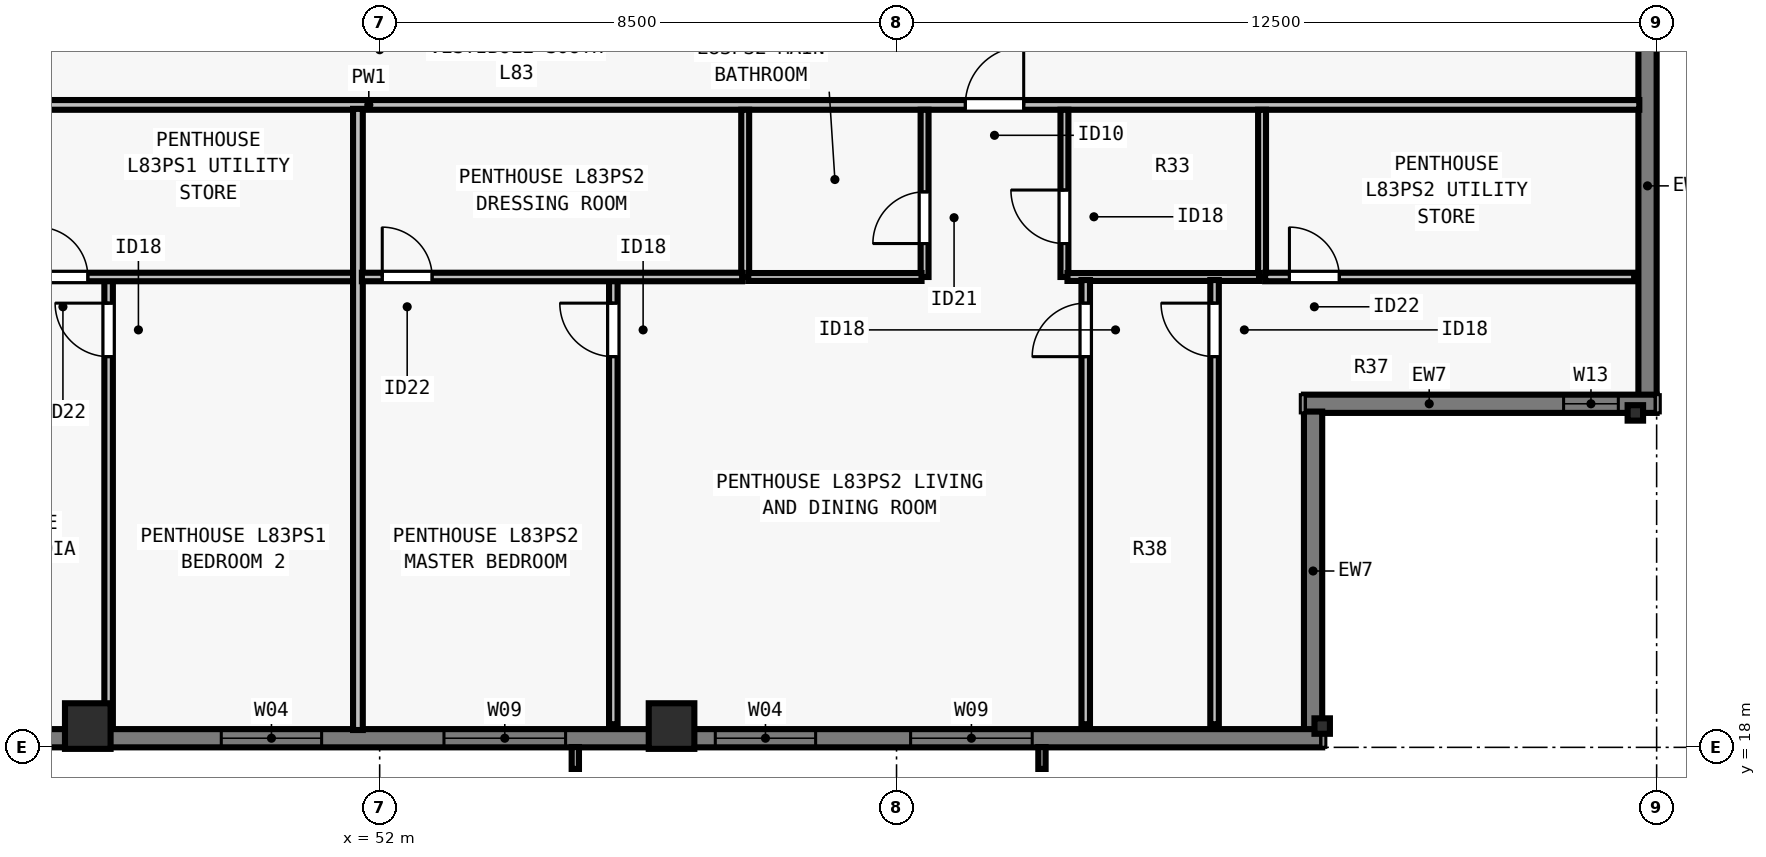
"""IFC4 building model, lengths in metres.
Left out: names, types, materials, properties, quantities, classifications, styles, units other than length and angle.
Written with IfcOpenShell. Run it as: python <this file> out.ifc"""

import sys

from ifc_helpers import new_model, si_unit, direction, frame, frame_2d, origin, origin_2d, place, context, subcontext, project, spatial, rectangle, i_section, extrude, element, fill, save


model = new_model("IFC4")
c1 = context("Model", 3, precision=1e-05, world=origin(), true_north=direction((0.0, 1.0)))
c2 = subcontext(c1, "Body", "Model", "MODEL_VIEW")
j1 = project(units=[si_unit("LENGTHUNIT", "METRE"), si_unit("PLANEANGLEUNIT", "RADIAN")], contexts=[c1])
p1 = place(None, origin())
s1 = spatial("IfcSite", under=j1, at=p1, CompositionType="ELEMENT")
p2 = place(p1, origin())
s2 = spatial("IfcBuilding", under=s1, at=p2, CompositionType="ELEMENT")
p3 = place(p2, frame((0.0, 0.0, 301.5)))
s3 = spatial("IfcBuildingStorey", under=s2, at=p3, CompositionType="ELEMENT", Elevation=301.5)
for number, where, z_axis, x_axis in (
    (1, (47.2, 18.35, 0.0), (0.0, 0.0, 1.0), (1.0, 0.0, 0.0)),
    (2, (56.8, 18.35, 0.0), (0.0, 0.0, 1.0), (1.0, 0.0, 0.0)),
):
    element("IfcColumn", number, at=place(p3, frame(where, z_axis=z_axis, x_axis=x_axis)), inside=s3, PredefinedType="COLUMN", context=c2, shape_type="SweptSolid", body=[
        extrude(rectangle(XDim=0.75, YDim=0.75, at=origin_2d()), origin(), (0.0, 0.0, 1.0), 3.5),
    ])
for number, where, z_axis, x_axis in (
    (3, (67.5, 18.35, 0.0), (0.0, 0.0, 1.0), (1.0, 0.0, 0.0)),
    (4, (72.65, 23.5, 0.0), (0.0, 0.0, 1.0), (0.0, 1.0, 0.0)),
):
    element("IfcColumn", number, at=place(p3, frame(where, z_axis=z_axis, x_axis=x_axis)), inside=s3, PredefinedType="COLUMN", context=c2, shape_type="SweptSolid", body=[
        extrude(i_section(OverallWidth=0.254, OverallDepth=0.254, WebThickness=0.009, FlangeThickness=0.014, FilletRadius=0.013, at=origin_2d()), origin(), (0.0, 0.0, 1.0), 3.5),
    ])
p4 = place(p3, frame((72.85, 34.8, 0.0), z_axis=(0.0, 0.0, 1.0), x_axis=(0.0, -1.0, 0.0)))
e5 = element("IfcWall", 5, at=p4, inside=s3, PredefinedType="SOLIDWALL", context=c2, shape_type="SweptSolid", body=[
    extrude(rectangle(XDim=11.022, YDim=0.3, at=frame_2d((5.511, 0.0))), origin(), (0.0, 0.0, 1.0), 3.29),
])
p5 = place(p4, frame((1.961, 0.0, 0.8)))
e6 = element("IfcOpeningElement", 6, at=p5, cuts=e5, PredefinedType="OPENING", context=c2, shape_type="SweptSolid", body=[
    extrude(rectangle(XDim=2.0, YDim=1.758, at=frame_2d((1.0, 0.879))), frame((0.0, 0.16, 0.0), z_axis=(0.0, -1.0, 0.0), x_axis=(1.0, 0.0, 0.0)), (0.0, 0.0, 1.0), 0.32),
])
p6 = place(p3, frame((73.0, 23.65, 0.0), z_axis=(0.0, 0.0, 1.0), x_axis=(-1.0, 0.0, 0.0)))
e7 = element("IfcWall", 7, at=p6, inside=s3, PredefinedType="SOLIDWALL", context=c2, shape_type="SweptSolid", body=[
    extrude(rectangle(XDim=5.8, YDim=0.3, at=frame_2d((2.9, 0.0))), origin(), (0.0, 0.0, 1.0), 3.29),
])
p7 = place(p6, frame((0.63, 0.0, 0.8)))
e8 = element("IfcOpeningElement", 8, at=p7, cuts=e7, PredefinedType="OPENING", context=c2, shape_type="SweptSolid", body=[
    extrude(rectangle(XDim=0.9, YDim=1.75, at=frame_2d((0.45, 0.875))), frame((0.0, 0.16, 0.0), z_axis=(0.0, -1.0, 0.0), x_axis=(1.0, 0.0, 0.0)), (0.0, 0.0, 1.0), 0.32),
])
p8 = place(p3, frame((67.35, 23.522, 0.0), z_axis=(0.0, 0.0, 1.0), x_axis=(0.0, -1.0, 0.0)))
e9 = element("IfcWall", 9, at=p8, inside=s3, PredefinedType="SOLIDWALL", context=c2, shape_type="SweptSolid", body=[
    extrude(rectangle(XDim=5.244, YDim=0.3, at=frame_2d((2.622, 0.0))), origin(), (0.0, 0.0, 1.0), 3.29),
])
p9 = place(p3, frame((67.5, 18.15, 0.0), z_axis=(0.0, 0.0, 1.0), x_axis=(-1.0, 0.0, 0.0)))
e10 = element("IfcWall", 10, at=p9, inside=s3, PredefinedType="SOLIDWALL", context=c2, shape_type="SweptSolid", body=[
    extrude(rectangle(XDim=30.722, YDim=0.3, at=frame_2d((15.361, 0.0))), origin(), (0.0, 0.0, 1.0), 3.29),
])
p10 = place(p9, frame((4.769, 0.0, 0.8)))
e11 = element("IfcOpeningElement", 11, at=p10, cuts=e10, PredefinedType="OPENING", context=c2, shape_type="SweptSolid", body=[
    extrude(rectangle(XDim=2.0, YDim=1.758, at=frame_2d((1.0, 0.879))), frame((0.0, 0.16, 0.0), z_axis=(0.0, -1.0, 0.0), x_axis=(1.0, 0.0, 0.0)), (0.0, 0.0, 1.0), 0.32),
])
p11 = place(p9, frame((8.331, 0.0, 0.8)))
e12 = element("IfcOpeningElement", 12, at=p11, cuts=e10, PredefinedType="OPENING", context=c2, shape_type="SweptSolid", body=[
    extrude(rectangle(XDim=1.65, YDim=1.758, at=frame_2d((0.825, 0.879))), frame((0.0, 0.16, 0.0), z_axis=(0.0, -1.0, 0.0), x_axis=(1.0, 0.0, 0.0)), (0.0, 0.0, 1.0), 0.32),
])
p12 = place(p9, frame((12.442, 0.0, 0.8)))
e13 = element("IfcOpeningElement", 13, at=p12, cuts=e10, PredefinedType="OPENING", context=c2, shape_type="SweptSolid", body=[
    extrude(rectangle(XDim=2.0, YDim=1.758, at=frame_2d((1.0, 0.879))), frame((0.0, 0.16, 0.0), z_axis=(0.0, -1.0, 0.0), x_axis=(1.0, 0.0, 0.0)), (0.0, 0.0, 1.0), 0.32),
])
p13 = place(p9, frame((16.455, 0.0, 0.8)))
e14 = element("IfcOpeningElement", 14, at=p13, cuts=e10, PredefinedType="OPENING", context=c2, shape_type="SweptSolid", body=[
    extrude(rectangle(XDim=1.65, YDim=1.758, at=frame_2d((0.825, 0.879))), frame((0.0, 0.16, 0.0), z_axis=(0.0, -1.0, 0.0), x_axis=(1.0, 0.0, 0.0)), (0.0, 0.0, 1.0), 0.32),
])
p14 = place(p9, frame((20.967, 0.0, 0.8)))
e15 = element("IfcOpeningElement", 15, at=p14, cuts=e10, PredefinedType="OPENING", context=c2, shape_type="SweptSolid", body=[
    extrude(rectangle(XDim=2.0, YDim=1.758, at=frame_2d((1.0, 0.879))), frame((0.0, 0.16, 0.0), z_axis=(0.0, -1.0, 0.0), x_axis=(1.0, 0.0, 0.0)), (0.0, 0.0, 1.0), 0.32),
])
p15 = place(p9, frame((24.128, 0.0, 0.8)))
e16 = element("IfcOpeningElement", 16, at=p15, cuts=e10, PredefinedType="OPENING", context=c2, shape_type="SweptSolid", body=[
    extrude(rectangle(XDim=1.65, YDim=1.758, at=frame_2d((0.825, 0.879))), frame((0.0, 0.16, 0.0), z_axis=(0.0, -1.0, 0.0), x_axis=(1.0, 0.0, 0.0)), (0.0, 0.0, 1.0), 0.32),
])
p16 = place(p3, frame((31.285, 28.565, 0.0), z_axis=(0.0, 0.0, 1.0), x_axis=(1.0, 0.0, 0.0)))
e17 = element("IfcWall", 17, at=p16, inside=s3, PredefinedType="PARTITIONING", context=c2, shape_type="SweptSolid", body=[
    extrude(rectangle(XDim=41.43, YDim=0.16, at=frame_2d((20.715, 0.0))), origin(), (0.0, 0.0, 1.0), 3.009),
])
p17 = place(p16, frame((9.766, 0.0, 0.0)))
e18 = element("IfcOpeningElement", 18, at=p17, cuts=e17, PredefinedType="OPENING", context=c2, shape_type="SweptSolid", body=[
    extrude(rectangle(XDim=0.96, YDim=2.18, at=frame_2d((0.48, 1.09))), frame((0.0, 0.09, 0.0), z_axis=(0.0, -1.0, 0.0), x_axis=(1.0, 0.0, 0.0)), (0.0, 0.0, 1.0), 0.18),
])
p18 = place(p16, frame((30.346, 0.0, 0.0)))
e19 = element("IfcOpeningElement", 19, at=p18, cuts=e17, PredefinedType="OPENING", context=c2, shape_type="SweptSolid", body=[
    extrude(rectangle(XDim=0.96, YDim=2.18, at=frame_2d((0.48, 1.09))), frame((0.0, 0.09, 0.0), z_axis=(0.0, -1.0, 0.0), x_axis=(1.0, 0.0, 0.0)), (0.0, 0.0, 1.0), 0.18),
])
p19 = place(p3, frame((47.542, 18.38, 0.0), z_axis=(0.0, 0.0, 1.0), x_axis=(0.0, 1.0, 0.0)))
e20 = element("IfcWall", 20, at=p19, inside=s3, PredefinedType="PARTITIONING", context=c2, shape_type="SweptSolid", body=[
    extrude(rectangle(XDim=7.395, YDim=0.14, at=frame_2d((3.698, 0.0))), origin(), (0.0, 0.0, 1.0), 3.009),
])
p20 = place(p19, frame((6.045, 0.0, 0.0)))
e21 = element("IfcOpeningElement", 21, at=p20, cuts=e20, PredefinedType="OPENING", context=c2, shape_type="SweptSolid", body=[
    extrude(rectangle(XDim=0.88, YDim=2.1, at=frame_2d((0.44, 1.05))), frame((0.0, 0.08, 0.0), z_axis=(0.0, -1.0, 0.0), x_axis=(1.0, 0.0, 0.0)), (0.0, 0.0, 1.0), 0.16),
])
p21 = place(p3, frame((45.981, 25.735, 0.0), z_axis=(0.0, 0.0, 1.0), x_axis=(1.0, 0.0, 0.0)))
e22 = element("IfcWall", 22, at=p21, inside=s3, PredefinedType="PARTITIONING", context=c2, shape_type="SweptSolid", body=[
    extrude(rectangle(XDim=5.711, YDim=0.14, at=frame_2d((2.855, 0.0))), origin(), (0.0, 0.0, 1.0), 3.29),
])
p22 = place(p21, frame((0.4, 0.0, 0.0)))
e23 = element("IfcOpeningElement", 23, at=p22, cuts=e22, PredefinedType="OPENING", context=c2, shape_type="SweptSolid", body=[
    extrude(rectangle(XDim=0.82, YDim=2.1, at=frame_2d((0.41, 1.05))), frame((0.0, 0.08, 0.0), z_axis=(0.0, -1.0, 0.0), x_axis=(1.0, 0.0, 0.0)), (0.0, 0.0, 1.0), 0.16),
])
p23 = place(p3, frame((51.643, 18.285, 0.0), z_axis=(0.0, 0.0, 1.0), x_axis=(0.0, 1.0, 0.0)))
e24 = element("IfcWall", 24, at=p23, inside=s3, PredefinedType="PARTITIONING", context=c2, shape_type="SweptSolid", body=[
    extrude(rectangle(XDim=10.215, YDim=0.16, at=frame_2d((5.107, 0.0))), origin(), (0.0, 0.0, 1.0), 3.009),
])
p24 = place(p3, frame((58.011, 25.735, 0.0), z_axis=(0.0, 0.0, 1.0), x_axis=(0.0, 1.0, 0.0)))
e25 = element("IfcWall", 25, at=p24, inside=s3, PredefinedType="PLUMBINGWALL", context=c2, shape_type="SweptSolid", body=[
    extrude(rectangle(XDim=2.75, YDim=0.13, at=frame_2d((1.375, 0.0))), origin(), (0.0, 0.0, 1.0), 3.29),
])
p25 = place(p3, frame((60.961, 25.735, 0.0), z_axis=(0.0, 0.0, 1.0), x_axis=(0.0, 1.0, 0.0)))
e26 = element("IfcWall", 26, at=p25, inside=s3, PredefinedType="PLUMBINGWALL", context=c2, shape_type="SweptSolid", body=[
    extrude(rectangle(XDim=2.75, YDim=0.13, at=frame_2d((1.375, 0.0))), origin(), (0.0, 0.0, 1.0), 3.29),
])
p26 = place(p25, frame((0.55, 0.0, 0.0)))
e27 = element("IfcOpeningElement", 27, at=p26, cuts=e26, PredefinedType="OPENING", context=c2, shape_type="SweptSolid", body=[
    extrude(rectangle(XDim=0.85, YDim=2.08, at=frame_2d((0.425, 1.04))), frame((0.0, 0.075, 0.0), z_axis=(0.0, -1.0, 0.0), x_axis=(1.0, 0.0, 0.0)), (0.0, 0.0, 1.0), 0.15),
])
p27 = place(p3, frame((58.061, 25.735, 0.0), z_axis=(0.0, 0.0, 1.0), x_axis=(1.0, 0.0, 0.0)))
e28 = element("IfcWall", 28, at=p27, inside=s3, PredefinedType="PLUMBINGWALL", context=c2, shape_type="SweptSolid", body=[
    extrude(rectangle(XDim=2.85, YDim=0.13, at=frame_2d((1.425, 0.0))), origin(), (0.0, 0.0, 1.0), 3.29),
])
p28 = place(p3, frame((66.511, 25.735, 0.0), z_axis=(0.0, 0.0, 1.0), x_axis=(0.0, 1.0, 0.0)))
e29 = element("IfcWall", 29, at=p28, inside=s3, PredefinedType="PLUMBINGWALL", context=c2, shape_type="SweptSolid", body=[
    extrude(rectangle(XDim=2.75, YDim=0.13, at=frame_2d((1.375, 0.0))), origin(), (0.0, 0.0, 1.0), 3.29),
])
p29 = place(p3, frame((63.261, 25.735, 0.0), z_axis=(0.0, 0.0, 1.0), x_axis=(0.0, 1.0, 0.0)))
e30 = element("IfcWall", 30, at=p29, inside=s3, PredefinedType="PLUMBINGWALL", context=c2, shape_type="SweptSolid", body=[
    extrude(rectangle(XDim=2.75, YDim=0.13, at=frame_2d((1.375, 0.0))), origin(), (0.0, 0.0, 1.0), 3.29),
])
p30 = place(p29, frame((0.55, 0.0, 0.0)))
e31 = element("IfcOpeningElement", 31, at=p30, cuts=e30, PredefinedType="OPENING", context=c2, shape_type="SweptSolid", body=[
    extrude(rectangle(XDim=0.88, YDim=2.1, at=frame_2d((0.44, 1.05))), frame((0.0, 0.075, 0.0), z_axis=(0.0, -1.0, 0.0), x_axis=(1.0, 0.0, 0.0)), (0.0, 0.0, 1.0), 0.15),
])
p31 = place(p3, frame((63.311, 25.735, 0.0), z_axis=(0.0, 0.0, 1.0), x_axis=(1.0, 0.0, 0.0)))
e32 = element("IfcWall", 32, at=p31, inside=s3, PredefinedType="PLUMBINGWALL", context=c2, shape_type="SweptSolid", body=[
    extrude(rectangle(XDim=3.15, YDim=0.13, at=frame_2d((1.575, 0.0))), origin(), (0.0, 0.0, 1.0), 3.29),
])
p32 = place(p3, frame((55.843, 18.38, 0.0), z_axis=(0.0, 0.0, 1.0), x_axis=(0.0, 1.0, 0.0)))
e33 = element("IfcWall", 33, at=p32, inside=s3, PredefinedType="PARTITIONING", context=c2, shape_type="SweptSolid", body=[
    extrude(rectangle(XDim=7.395, YDim=0.14, at=frame_2d((3.698, 0.0))), origin(), (0.0, 0.0, 1.0), 3.29),
])
p33 = place(p32, frame((6.045, 0.0, 0.0)))
e34 = element("IfcOpeningElement", 34, at=p33, cuts=e33, PredefinedType="OPENING", context=c2, shape_type="SweptSolid", body=[
    extrude(rectangle(XDim=0.88, YDim=2.1, at=frame_2d((0.44, 1.05))), frame((0.0, 0.08, 0.0), z_axis=(0.0, -1.0, 0.0), x_axis=(1.0, 0.0, 0.0)), (0.0, 0.0, 1.0), 0.16),
])
p34 = place(p3, frame((51.708, 25.735, 0.0), z_axis=(0.0, 0.0, 1.0), x_axis=(1.0, 0.0, 0.0)))
e35 = element("IfcWall", 35, at=p34, inside=s3, PredefinedType="PARTITIONING", context=c2, shape_type="SweptSolid", body=[
    extrude(rectangle(XDim=6.254, YDim=0.14, at=frame_2d((3.127, 0.0))), origin(), (0.0, 0.0, 1.0), 3.29),
])
p35 = place(p34, frame((0.335, 0.0, 0.0)))
e36 = element("IfcOpeningElement", 36, at=p35, cuts=e35, PredefinedType="OPENING", context=c2, shape_type="SweptSolid", body=[
    extrude(rectangle(XDim=0.82, YDim=2.1, at=frame_2d((0.41, 1.05))), frame((0.0, 0.08, 0.0), z_axis=(0.0, -1.0, 0.0), x_axis=(1.0, 0.0, 0.0)), (0.0, 0.0, 1.0), 0.16),
])
p36 = place(p3, frame((65.73, 18.38, 0.0), z_axis=(0.0, 0.0, 1.0), x_axis=(0.0, 1.0, 0.0)))
e37 = element("IfcWall", 37, at=p36, inside=s3, PredefinedType="PARTITIONING", context=c2, shape_type="SweptSolid", body=[
    extrude(rectangle(XDim=7.305, YDim=0.14, at=frame_2d((3.653, 0.0))), origin(), (0.0, 0.0, 1.0), 2.653),
])
p37 = place(p36, frame((6.045, 0.0, 0.0)))
e38 = element("IfcOpeningElement", 38, at=p37, cuts=e37, PredefinedType="OPENING", context=c2, shape_type="SweptSolid", body=[
    extrude(rectangle(XDim=0.88, YDim=2.1, at=frame_2d((0.44, 1.05))), frame((0.0, 0.08, 0.0), z_axis=(0.0, -1.0, 0.0), x_axis=(1.0, 0.0, 0.0)), (0.0, 0.0, 1.0), 0.16),
])
p38 = place(p3, frame((66.561, 25.735, 0.0), z_axis=(0.0, 0.0, 1.0), x_axis=(1.0, 0.0, 0.0)))
e39 = element("IfcWall", 39, at=p38, inside=s3, PredefinedType="PARTITIONING", context=c2, shape_type="SweptSolid", body=[
    extrude(rectangle(XDim=6.069, YDim=0.14, at=frame_2d((3.034, 0.0))), origin(), (0.0, 0.0, 1.0), 3.009),
])
p39 = place(p38, frame((0.4, 0.0, 0.0)))
e40 = element("IfcOpeningElement", 40, at=p39, cuts=e39, PredefinedType="OPENING", context=c2, shape_type="SweptSolid", body=[
    extrude(rectangle(XDim=0.82, YDim=2.1, at=frame_2d((0.41, 1.05))), frame((0.0, 0.08, 0.0), z_axis=(0.0, -1.0, 0.0), x_axis=(1.0, 0.0, 0.0)), (0.0, 0.0, 1.0), 0.16),
])
p40 = place(p3, frame((63.611, 18.38, 0.0), z_axis=(0.0, 0.0, 1.0), x_axis=(0.0, 1.0, 0.0)))
e41 = element("IfcWall", 41, at=p40, inside=s3, PredefinedType="PARTITIONING", context=c2, shape_type="SweptSolid", body=[
    extrude(rectangle(XDim=7.305, YDim=0.14, at=frame_2d((3.653, 0.0))), origin(), (0.0, 0.0, 1.0), 2.653),
])
p41 = place(p40, frame((6.045, 0.0, 0.0)))
e42 = element("IfcOpeningElement", 42, at=p41, cuts=e41, PredefinedType="OPENING", context=c2, shape_type="SweptSolid", body=[
    extrude(rectangle(XDim=0.88, YDim=2.1, at=frame_2d((0.44, 1.05))), frame((0.0, 0.08, 0.0), z_axis=(0.0, -1.0, 0.0), x_axis=(1.0, 0.0, 0.0)), (0.0, 0.0, 1.0), 0.16),
])
p42 = place(p10, origin())
e43 = element("IfcWindow", 43, at=p42, inside=s3, PartitioningType="SINGLE_PANEL", PredefinedType="WINDOW", context=c2, shape_type="SweptSolid", body=[
    extrude(rectangle(XDim=2.0, YDim=1.758, at=frame_2d((1.0, 0.879))), frame((0.0, -0.05, 0.0), z_axis=(0.0, -1.0, 0.0), x_axis=(1.0, 0.0, 0.0)), (0.0, 0.0, 1.0), 0.06),
])
fill(e11, e43)
p43 = place(p11, origin())
e44 = element("IfcWindow", 44, at=p43, inside=s3, PartitioningType="SINGLE_PANEL", PredefinedType="WINDOW", context=c2, shape_type="SweptSolid", body=[
    extrude(rectangle(XDim=1.65, YDim=1.758, at=frame_2d((0.825, 0.879))), frame((0.0, -0.05, 0.0), z_axis=(0.0, -1.0, 0.0), x_axis=(1.0, 0.0, 0.0)), (0.0, 0.0, 1.0), 0.06),
])
fill(e12, e44)
p44 = place(p12, origin())
e45 = element("IfcWindow", 45, at=p44, inside=s3, PartitioningType="SINGLE_PANEL", PredefinedType="WINDOW", context=c2, shape_type="SweptSolid", body=[
    extrude(rectangle(XDim=2.0, YDim=1.758, at=frame_2d((1.0, 0.879))), frame((0.0, -0.05, 0.0), z_axis=(0.0, -1.0, 0.0), x_axis=(1.0, 0.0, 0.0)), (0.0, 0.0, 1.0), 0.06),
])
fill(e13, e45)
p45 = place(p13, origin())
e46 = element("IfcWindow", 46, at=p45, inside=s3, PartitioningType="SINGLE_PANEL", PredefinedType="WINDOW", context=c2, shape_type="SweptSolid", body=[
    extrude(rectangle(XDim=1.65, YDim=1.758, at=frame_2d((0.825, 0.879))), frame((0.0, -0.05, 0.0), z_axis=(0.0, -1.0, 0.0), x_axis=(1.0, 0.0, 0.0)), (0.0, 0.0, 1.0), 0.06),
])
fill(e14, e46)
p46 = place(p7, origin())
e47 = element("IfcWindow", 47, at=p46, inside=s3, PartitioningType="SINGLE_PANEL", PredefinedType="WINDOW", context=c2, shape_type="SweptSolid", body=[
    extrude(rectangle(XDim=0.9, YDim=1.75, at=frame_2d((0.45, 0.875))), frame((0.0, -0.04, 0.0), z_axis=(0.0, -1.0, 0.0), x_axis=(1.0, 0.0, 0.0)), (0.0, 0.0, 1.0), 0.06),
])
fill(e8, e47)
p47 = place(p22, origin())
e48 = element("IfcDoor", 48, at=p47, inside=s3, OperationType="SINGLE_SWING_LEFT", PredefinedType="DOOR", context=c2, shape_type="SweptSolid", body=[
    extrude(rectangle(XDim=0.82, YDim=2.1, at=frame_2d((0.41, 1.05))), frame((0.0, 0.025, 0.0), z_axis=(0.0, -1.0, 0.0), x_axis=(1.0, 0.0, 0.0)), (0.0, 0.0, 1.0), 0.05),
])
fill(e23, e48)
p48 = place(p20, origin())
e49 = element("IfcDoor", 49, at=p48, inside=s3, OperationType="SINGLE_SWING_RIGHT", PredefinedType="DOOR", context=c2, shape_type="SweptSolid", body=[
    extrude(rectangle(XDim=0.88, YDim=2.1, at=frame_2d((0.44, 1.05))), frame((0.0, 0.025, 0.0), z_axis=(0.0, -1.0, 0.0), x_axis=(1.0, 0.0, 0.0)), (0.0, 0.0, 1.0), 0.05),
])
fill(e21, e49)
p49 = place(p26, origin())
e50 = element("IfcDoor", 50, at=p49, inside=s3, OperationType="SINGLE_SWING_LEFT", PredefinedType="DOOR", context=c2, shape_type="SweptSolid", body=[
    extrude(rectangle(XDim=0.85, YDim=2.08, at=frame_2d((0.425, 1.04))), frame((0.0, 0.025, 0.0), z_axis=(0.0, -1.0, 0.0), x_axis=(1.0, 0.0, 0.0)), (0.0, 0.0, 1.0), 0.05),
])
fill(e27, e50)
p50 = place(p30, origin())
e51 = element("IfcDoor", 51, at=p50, inside=s3, OperationType="SINGLE_SWING_RIGHT", PredefinedType="DOOR", context=c2, shape_type="SweptSolid", body=[
    extrude(rectangle(XDim=0.88, YDim=2.1, at=frame_2d((0.44, 1.05))), frame((0.0, 0.025, 0.0), z_axis=(0.0, -1.0, 0.0), x_axis=(1.0, 0.0, 0.0)), (0.0, 0.0, 1.0), 0.05),
])
fill(e31, e51)
p51 = place(p35, origin())
e52 = element("IfcDoor", 52, at=p51, inside=s3, OperationType="SINGLE_SWING_LEFT", PredefinedType="DOOR", context=c2, shape_type="SweptSolid", body=[
    extrude(rectangle(XDim=0.82, YDim=2.1, at=frame_2d((0.41, 1.05))), frame((0.0, 0.025, 0.0), z_axis=(0.0, -1.0, 0.0), x_axis=(1.0, 0.0, 0.0)), (0.0, 0.0, 1.0), 0.05),
])
fill(e36, e52)
p52 = place(p33, origin())
e53 = element("IfcDoor", 53, at=p52, inside=s3, OperationType="SINGLE_SWING_RIGHT", PredefinedType="DOOR", context=c2, shape_type="SweptSolid", body=[
    extrude(rectangle(XDim=0.88, YDim=2.1, at=frame_2d((0.44, 1.05))), frame((0.0, 0.025, 0.0), z_axis=(0.0, -1.0, 0.0), x_axis=(1.0, 0.0, 0.0)), (0.0, 0.0, 1.0), 0.05),
])
fill(e34, e53)
p53 = place(p39, origin())
e54 = element("IfcDoor", 54, at=p53, inside=s3, OperationType="SINGLE_SWING_LEFT", PredefinedType="DOOR", context=c2, shape_type="SweptSolid", body=[
    extrude(rectangle(XDim=0.82, YDim=2.1, at=frame_2d((0.41, 1.05))), frame((0.0, 0.025, 0.0), z_axis=(0.0, -1.0, 0.0), x_axis=(1.0, 0.0, 0.0)), (0.0, 0.0, 1.0), 0.05),
])
fill(e40, e54)
p54 = place(p37, origin())
e55 = element("IfcDoor", 55, at=p54, inside=s3, OperationType="SINGLE_SWING_RIGHT", PredefinedType="DOOR", context=c2, shape_type="SweptSolid", body=[
    extrude(rectangle(XDim=0.88, YDim=2.1, at=frame_2d((0.44, 1.05))), frame((0.0, 0.025, 0.0), z_axis=(0.0, -1.0, 0.0), x_axis=(1.0, 0.0, 0.0)), (0.0, 0.0, 1.0), 0.05),
])
fill(e38, e55)
p55 = place(p41, origin())
e56 = element("IfcDoor", 56, at=p55, inside=s3, OperationType="SINGLE_SWING_LEFT", PredefinedType="DOOR", context=c2, shape_type="SweptSolid", body=[
    extrude(rectangle(XDim=0.88, YDim=2.1, at=frame_2d((0.44, 1.05))), frame((0.0, 0.025, 0.0), z_axis=(0.0, -1.0, 0.0), x_axis=(1.0, 0.0, 0.0)), (0.0, 0.0, 1.0), 0.05),
])
fill(e42, e56)
p56 = place(p18, origin())
e57 = element("IfcDoor", 57, at=p56, inside=s3, OperationType="SINGLE_SWING_RIGHT", PredefinedType="DOOR", context=c2, shape_type="SweptSolid", body=[
    extrude(rectangle(XDim=0.96, YDim=2.18, at=frame_2d((0.48, 1.09))), frame((0.0, 0.025, 0.0), z_axis=(0.0, -1.0, 0.0), x_axis=(1.0, 0.0, 0.0)), (0.0, 0.0, 1.0), 0.05),
])
fill(e19, e57)
save(model, sys.argv[1])
